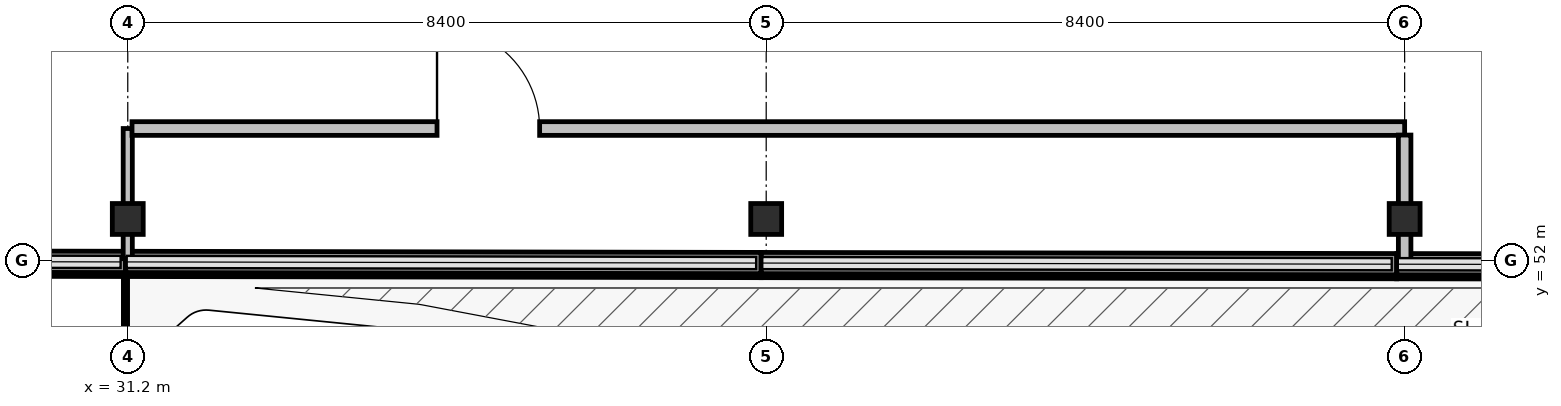
"""IFC4 building model, lengths in metres.
Left out: names, types, materials, properties, quantities, classifications, styles, units other than length and angle.
Written with IfcOpenShell. Run it as: python <this file> out.ifc"""

import sys

from ifc_helpers import new_model, si_unit, direction, frame, frame_2d, origin, origin_2d, place, context, subcontext, project, spatial, rectangle, hollow_circle, extrude, element, fill, save


model = new_model("IFC4")
c1 = context("Model", 3, precision=1e-05, world=origin(), true_north=direction((0.0, 1.0)))
c2 = subcontext(c1, "Body", "Model", "MODEL_VIEW")
j1 = project(units=[si_unit("LENGTHUNIT", "METRE"), si_unit("PLANEANGLEUNIT", "RADIAN")], contexts=[c1])
p1 = place(None, origin())
s1 = spatial("IfcSite", under=j1, at=p1, CompositionType="ELEMENT")
p2 = place(p1, origin())
s2 = spatial("IfcBuilding", under=s1, at=p2, CompositionType="ELEMENT")
p3 = place(p2, frame((0.0, 0.0, 5.4)))
s3 = spatial("IfcBuildingStorey", under=s2, at=p3, CompositionType="ELEMENT", Elevation=5.4)
for number, where, z_axis, x_axis in (
    (1, (31.2, 52.55, 0.0), (0.0, 0.0, 1.0), (1.0, 0.0, 0.0)),
    (2, (39.6, 52.55, 0.0), (0.0, 0.0, 1.0), (1.0, 0.0, 0.0)),
    (3, (48.0, 52.55, 0.0), (0.0, 0.0, 1.0), (1.0, 0.0, 0.0)),
):
    element("IfcColumn", number, at=place(p3, frame(where, z_axis=z_axis, x_axis=x_axis)), inside=s3, PredefinedType="COLUMN", context=c2, shape_type="SweptSolid", body=[
        extrude(hollow_circle(Radius=0.203, WallThickness=0.016, at=origin_2d()), origin(), (0.0, 0.0, 1.0), 4.8),
    ])
p4 = place(p3, frame((56.254, 51.94, 0.0), z_axis=(0.0, 0.0, 1.0), x_axis=(-0.999998359642, 0.001811273687, 0.0)))
e4 = element("IfcWall", 4, at=p4, inside=s3, PredefinedType="SOLIDWALL", context=c2, shape_type="SweptSolid", body=[
    extrude(rectangle(XDim=8.357, YDim=0.28, at=frame_2d((4.178, 0.0))), origin(), (0.0, 0.0, 1.0), 0.94),
])
p5 = place(p3, frame((47.893, 51.955, 0.0), z_axis=(0.0, 0.0, 1.0), x_axis=(-0.999998412594, 0.001781799421, 0.0)))
e5 = element("IfcWall", 5, at=p5, inside=s3, PredefinedType="SOLIDWALL", context=c2, shape_type="SweptSolid", body=[
    extrude(rectangle(XDim=8.358, YDim=0.28, at=frame_2d((4.179, 0.0))), origin(), (0.0, 0.0, 1.0), 0.94),
])
p6 = place(p3, frame((39.531, 51.97, 0.0), z_axis=(0.0, 0.0, 1.0), x_axis=(-0.999998360026, 0.001811062053, 0.0)))
e6 = element("IfcWall", 6, at=p6, inside=s3, PredefinedType="SOLIDWALL", context=c2, shape_type="SweptSolid", body=[
    extrude(rectangle(XDim=8.358, YDim=0.28, at=frame_2d((4.179, 0.0))), origin(), (0.0, 0.0, 1.0), 0.94),
])
p7 = place(p3, frame((31.169, 51.985, 0.0), z_axis=(0.0, 0.0, 1.0), x_axis=(-0.999998358775, 0.001811752647, 0.0)))
e7 = element("IfcWall", 7, at=p7, inside=s3, PredefinedType="SOLIDWALL", context=c2, shape_type="SweptSolid", body=[
    extrude(rectangle(XDim=8.22, YDim=0.28, at=frame_2d((4.11, 0.0))), origin(), (0.0, 0.0, 1.0), 0.94),
])
p8 = place(p3, frame((31.2, 52.027, 0.0), z_axis=(0.0, 0.0, 1.0), x_axis=(0.0, 1.0, 0.0)))
e8 = element("IfcWall", 8, at=p8, inside=s3, PredefinedType="PARTITIONING", context=c2, shape_type="SweptSolid", body=[
    extrude(rectangle(XDim=1.713, YDim=0.12, at=frame_2d((0.856, 0.0))), origin(), (0.0, 0.0, 1.0), 3.695),
])
p9 = place(p3, frame((31.256, 53.74, 0.0), z_axis=(0.0, 0.0, 1.0), x_axis=(1.0, 0.0, 0.0)))
e9 = element("IfcWall", 9, at=p9, inside=s3, PredefinedType="PARTITIONING", context=c2, shape_type="SweptSolid", body=[
    extrude(rectangle(XDim=16.744, YDim=0.18, at=frame_2d((8.372, 0.0))), origin(), (0.0, 0.0, 1.0), 4.445),
])
p10 = place(p9, frame((4.013, 0.0, 0.0)))
e10 = element("IfcOpeningElement", 10, at=p10, cuts=e9, PredefinedType="OPENING", context=c2, shape_type="SweptSolid", body=[
    extrude(rectangle(XDim=1.35, YDim=2.15, at=frame_2d((0.675, 1.075))), frame((0.0, 0.1, 0.0), z_axis=(0.0, -1.0, 0.0), x_axis=(1.0, 0.0, 0.0)), (0.0, 0.0, 1.0), 0.2),
])
p11 = place(p3, frame((48.0, 53.654, 0.0), z_axis=(0.0, 0.0, 1.0), x_axis=(0.0, -1.0, 0.0)))
e11 = element("IfcWall", 11, at=p11, inside=s3, PredefinedType="PARTITIONING", context=c2, shape_type="SweptSolid", body=[
    extrude(rectangle(XDim=1.644, YDim=0.165, at=frame_2d((0.822, 0.0))), origin(), (0.0, 0.0, 1.0), 3.695),
])
p12 = place(p10, origin())
e12 = element("IfcDoor", 12, at=p12, inside=s3, OperationType="SINGLE_SWING_LEFT", PredefinedType="DOOR", context=c2, shape_type="SweptSolid", body=[
    extrude(rectangle(XDim=1.35, YDim=2.15, at=frame_2d((0.675, 1.075))), frame((0.0, 0.025, 0.0), z_axis=(0.0, -1.0, 0.0), x_axis=(1.0, 0.0, 0.0)), (0.0, 0.0, 1.0), 0.05),
])
fill(e10, e12)
save(model, sys.argv[1])
